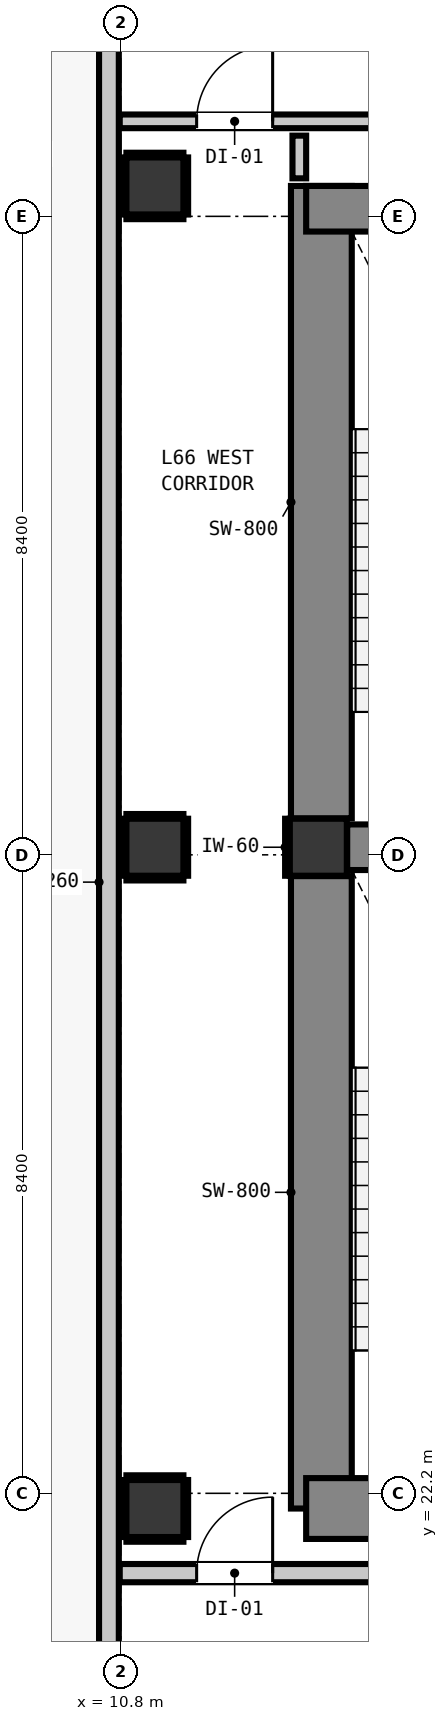
"""IFC4 building model, lengths in metres.
Left out: names, types, materials, properties, quantities, classifications, styles, units other than length and angle.
Written with IfcOpenShell. Run it as: python <this file> out.ifc"""

import sys

from ifc_helpers import new_model, si_unit, direction, frame, frame_2d, origin, origin_2d, place, context, subcontext, project, spatial, rectangle, extrude, element, fill, save


model = new_model("IFC4")
c1 = context("Model", 3, precision=1e-05, world=origin(), true_north=direction((0.0, 1.0)))
c2 = subcontext(c1, "Body", "Model", "MODEL_VIEW")
j1 = project(units=[si_unit("LENGTHUNIT", "METRE"), si_unit("PLANEANGLEUNIT", "RADIAN")], contexts=[c1])
p1 = place(None, origin())
s1 = spatial("IfcSite", under=j1, at=p1, CompositionType="ELEMENT")
p2 = place(p1, origin())
s2 = spatial("IfcBuilding", under=s1, at=p2, CompositionType="ELEMENT")
p3 = place(p2, frame((0.0, 0.0, 226.68)))
s3 = spatial("IfcBuildingStorey", under=s2, at=p3, CompositionType="ELEMENT", Elevation=226.68)
p4 = place(p3, frame((13.4, 30.7, 0.0), z_axis=(0.0, 0.0, 1.0), x_axis=(1.0, 0.0, 0.0)))
e1 = element("IfcColumn", 1, at=p4, inside=s3, PredefinedType="COLUMN", context=c2, shape_type="SweptSolid", body=[
    extrude(rectangle(XDim=0.75, YDim=0.75, at=origin_2d()), origin(), (0.0, 0.0, 1.0), 4.6),
])
p5 = place(p3, frame((13.44, 22.0, 0.0), z_axis=(0.0, 0.0, 1.0), x_axis=(0.0, 1.0, 0.0)))
e2 = element("IfcWall", 2, at=p5, inside=s3, PredefinedType="SHEAR", context=c2, shape_type="SweptSolid", body=[
    extrude(rectangle(XDim=8.32, YDim=0.8, at=frame_2d((4.16, 0.0))), origin(), (0.0, 0.0, 1.0), 4.6),
])
p6 = place(p3, frame((13.44, 31.08, 0.0), z_axis=(0.0, 0.0, 1.0), x_axis=(0.0, 1.0, 0.0)))
e3 = element("IfcWall", 3, at=p6, inside=s3, PredefinedType="SHEAR", context=c2, shape_type="SweptSolid", body=[
    extrude(rectangle(XDim=8.32, YDim=0.8, at=frame_2d((4.16, 0.0))), origin(), (0.0, 0.0, 1.0), 4.6),
])
p7 = place(p3, frame((13.24, 22.0, 0.0), z_axis=(0.0, 0.0, 1.0), x_axis=(1.0, 0.0, 0.0)))
e4 = element("IfcWall", 4, at=p7, inside=s3, PredefinedType="SHEAR", context=c2, shape_type="SweptSolid", body=[
    extrude(rectangle(XDim=4.08, YDim=0.8, at=frame_2d((2.04, 0.0))), origin(), (0.0, 0.0, 1.0), 4.6),
])
p8 = place(p3, frame((13.24, 39.1, 0.0), z_axis=(0.0, 0.0, 1.0), x_axis=(1.0, 0.0, 0.0)))
e5 = element("IfcWall", 5, at=p8, inside=s3, PredefinedType="SHEAR", context=c2, shape_type="SweptSolid", body=[
    extrude(rectangle(XDim=4.08, YDim=0.6, at=frame_2d((2.04, 0.0))), origin(), (0.0, 0.0, 1.0), 4.6),
])
p9 = place(p3, frame((13.78, 30.7, 0.0), z_axis=(0.0, 0.0, 1.0), x_axis=(1.0, 0.0, 0.0)))
e6 = element("IfcWall", 6, at=p9, inside=s3, PredefinedType="SHEAR", context=c2, shape_type="SweptSolid", body=[
    extrude(rectangle(XDim=3.54, YDim=0.6, at=frame_2d((1.77, 0.0))), origin(), (0.0, 0.0, 1.0), 4.6),
])
for number, where, z_axis, x_axis in (
    (7, (11.25, 22.0, 0.0), (0.0, 0.0, 1.0), (1.0, 0.0, 0.0)),
    (8, (11.25, 30.7, 0.0), (0.0, 0.0, 1.0), (1.0, 0.0, 0.0)),
    (9, (11.25, 39.4, 0.0), (0.0, 0.0, 1.0), (1.0, 0.0, 0.0)),
):
    element("IfcColumn", number, at=place(p3, frame(where, z_axis=z_axis, x_axis=x_axis)), inside=s3, PredefinedType="COLUMN", context=c2, shape_type="SweptSolid", body=[
        extrude(rectangle(XDim=0.75, YDim=0.75, at=origin_2d()), origin(), (0.0, 0.0, 1.0), 4.18),
    ])
p10 = place(p3, frame((10.645, 12.345, 0.0), z_axis=(0.0, 0.0, 1.0), x_axis=(0.0, 1.0, 0.0)))
e10 = element("IfcWall", 10, at=p10, inside=s3, PredefinedType="STANDARD", context=c2, shape_type="SweptSolid", body=[
    extrude(rectangle(XDim=30.31, YDim=0.26, at=frame_2d((15.155, 0.0))), origin(), (0.0, 0.0, 1.0), 4.18),
])
p11 = place(p10, frame((0.91, 0.0, 0.0)))
e11 = element("IfcOpeningElement", 11, at=p11, cuts=e10, PredefinedType="OPENING", context=c2, shape_type="SweptSolid", body=[
    extrude(rectangle(XDim=1.0, YDim=2.15, at=frame_2d((0.5, 1.075))), frame((0.0, 0.14, 0.0), z_axis=(0.0, -1.0, 0.0), x_axis=(1.0, 0.0, 0.0)), (0.0, 0.0, 1.0), 0.28),
])
p12 = place(p10, frame((3.732, 0.0, 0.85)))
e12 = element("IfcOpeningElement", 12, at=p12, cuts=e10, PredefinedType="OPENING", context=c2, shape_type="SweptSolid", body=[
    extrude(rectangle(XDim=1.65, YDim=1.75, at=frame_2d((0.825, 0.875))), frame((0.0, 0.14, 0.0), z_axis=(0.0, -1.0, 0.0), x_axis=(1.0, 0.0, 0.0)), (0.0, 0.0, 1.0), 0.28),
])
p13 = place(p3, frame((10.787, 21.15, 0.0), z_axis=(0.0, 0.0, 1.0), x_axis=(1.0, 0.0, 0.0)))
e13 = element("IfcWall", 13, at=p13, inside=s3, PredefinedType="PARTITIONING", context=c2, shape_type="SweptSolid", body=[
    extrude(rectangle(XDim=36.626, YDim=0.24, at=frame_2d((18.313, 0.0))), origin(), (0.0, 0.0, 1.0), 4.18),
])
p14 = place(p13, frame((7.423, 0.0, 0.0)))
e14 = element("IfcOpeningElement", 14, at=p14, cuts=e13, PredefinedType="OPENING", context=c2, shape_type="SweptSolid", body=[
    extrude(rectangle(XDim=1.1, YDim=2.15, at=frame_2d((0.55, 1.075))), frame((0.0, 0.13, 0.0), z_axis=(0.0, -1.0, 0.0), x_axis=(1.0, 0.0, 0.0)), (0.0, 0.0, 1.0), 0.26),
])
p15 = place(p13, frame((1.012, 0.0, 0.0)))
e15 = element("IfcOpeningElement", 15, at=p15, cuts=e13, PredefinedType="OPENING", context=c2, shape_type="SweptSolid", body=[
    extrude(rectangle(XDim=1.0, YDim=2.15, at=frame_2d((0.5, 1.075))), frame((0.0, 0.13, 0.0), z_axis=(0.0, -1.0, 0.0), x_axis=(1.0, 0.0, 0.0)), (0.0, 0.0, 1.0), 0.26),
])
p16 = place(p13, frame((27.239, 0.0, 0.0)))
e16 = element("IfcOpeningElement", 16, at=p16, cuts=e13, PredefinedType="OPENING", context=c2, shape_type="SweptSolid", body=[
    extrude(rectangle(XDim=1.4, YDim=2.15, at=frame_2d((0.7, 1.075))), frame((0.0, 0.13, 0.0), z_axis=(0.0, -1.0, 0.0), x_axis=(1.0, 0.0, 0.0)), (0.0, 0.0, 1.0), 0.26),
])
p17 = place(p3, frame((10.787, 40.25, 0.0), z_axis=(0.0, 0.0, 1.0), x_axis=(1.0, 0.0, 0.0)))
e17 = element("IfcWall", 17, at=p17, inside=s3, PredefinedType="PARTITIONING", context=c2, shape_type="SweptSolid", body=[
    extrude(rectangle(XDim=36.626, YDim=0.18, at=frame_2d((18.313, 0.0))), origin(), (0.0, 0.0, 1.0), 4.18),
])
p18 = place(p17, frame((6.648, 0.0, 0.0)))
e18 = element("IfcOpeningElement", 18, at=p18, cuts=e17, PredefinedType="OPENING", context=c2, shape_type="SweptSolid", body=[
    extrude(rectangle(XDim=1.4, YDim=2.15, at=frame_2d((0.7, 1.075))), frame((0.0, 0.1, 0.0), z_axis=(0.0, -1.0, 0.0), x_axis=(1.0, 0.0, 0.0)), (0.0, 0.0, 1.0), 0.2),
])
p19 = place(p17, frame((1.012, 0.0, 0.0)))
e19 = element("IfcOpeningElement", 19, at=p19, cuts=e17, PredefinedType="OPENING", context=c2, shape_type="SweptSolid", body=[
    extrude(rectangle(XDim=1.0, YDim=2.15, at=frame_2d((0.5, 1.075))), frame((0.0, 0.1, 0.0), z_axis=(0.0, -1.0, 0.0), x_axis=(1.0, 0.0, 0.0)), (0.0, 0.0, 1.0), 0.2),
])
p20 = place(p17, frame((27.263, 0.0, 0.0)))
e20 = element("IfcOpeningElement", 20, at=p20, cuts=e17, PredefinedType="OPENING", context=c2, shape_type="SweptSolid", body=[
    extrude(rectangle(XDim=1.4, YDim=2.15, at=frame_2d((0.7, 1.075))), frame((0.0, 0.1, 0.0), z_axis=(0.0, -1.0, 0.0), x_axis=(1.0, 0.0, 0.0)), (0.0, 0.0, 1.0), 0.2),
])
p21 = place(p17, frame((32.289, 0.0, 0.0)))
e21 = element("IfcOpeningElement", 21, at=p21, cuts=e17, PredefinedType="OPENING", context=c2, shape_type="SweptSolid", body=[
    extrude(rectangle(XDim=0.95, YDim=2.1, at=frame_2d((0.475, 1.05))), frame((0.0, 0.1, 0.0), z_axis=(0.0, -1.0, 0.0), x_axis=(1.0, 0.0, 0.0)), (0.0, 0.0, 1.0), 0.2),
])
p22 = place(p3, frame((13.15, 39.5, 0.0), z_axis=(0.0, 0.0, 1.0), x_axis=(0.0, 1.0, 0.0)))
e22 = element("IfcWall", 22, at=p22, inside=s3, PredefinedType="PARTITIONING", context=c2, shape_type="SweptSolid", body=[
    extrude(rectangle(XDim=0.562, YDim=0.18, at=frame_2d((0.281, 0.0))), origin(), (0.0, 0.0, 1.0), 2.185),
])
for number, where, z_axis, x_axis in (
    (23, (12.993, 30.325, 0.0), (0.0, 0.0, 1.0), (0.0, 1.0, 0.0)),
    (24, (10.875, 21.593, 0.0), (0.0, 0.0, 1.0), (1.0, 0.0, 0.0)),
    (25, (10.875, 22.407, 0.0), (0.0, 0.0, 1.0), (1.0, 0.0, 0.0)),
    (26, (10.843, 21.625, 0.0), (0.0, 0.0, 1.0), (0.0, 1.0, 0.0)),
    (27, (11.657, 21.625, 0.0), (0.0, 0.0, 1.0), (0.0, 1.0, 0.0)),
    (28, (10.875, 30.293, 0.0), (0.0, 0.0, 1.0), (1.0, 0.0, 0.0)),
    (29, (10.875, 31.107, 0.0), (0.0, 0.0, 1.0), (1.0, 0.0, 0.0)),
    (30, (10.843, 30.325, 0.0), (0.0, 0.0, 1.0), (0.0, 1.0, 0.0)),
    (31, (11.657, 30.325, 0.0), (0.0, 0.0, 1.0), (0.0, 1.0, 0.0)),
    (32, (10.875, 38.993, 0.0), (0.0, 0.0, 1.0), (1.0, 0.0, 0.0)),
    (33, (10.875, 39.807, 0.0), (0.0, 0.0, 1.0), (1.0, 0.0, 0.0)),
    (34, (10.843, 39.025, 0.0), (0.0, 0.0, 1.0), (0.0, 1.0, 0.0)),
    (35, (11.657, 39.025, 0.0), (0.0, 0.0, 1.0), (0.0, 1.0, 0.0)),
):
    element("IfcWall", number, at=place(p3, frame(where, z_axis=z_axis, x_axis=x_axis)), inside=s3, PredefinedType="PARTITIONING", context=c2, shape_type="SweptSolid", body=[
        extrude(rectangle(XDim=0.75, YDim=0.06, at=frame_2d((0.375, 0.0))), origin(), (0.0, 0.0, 1.0), 1.45),
    ])
p23 = place(p15, origin())
e36 = element("IfcDoor", 36, at=p23, inside=s3, OperationType="SINGLE_SWING_RIGHT", PredefinedType="DOOR", context=c2, shape_type="SweptSolid", body=[
    extrude(rectangle(XDim=1.0, YDim=2.15, at=frame_2d((0.5, 1.075))), frame((0.0, 0.025, 0.0), z_axis=(0.0, -1.0, 0.0), x_axis=(1.0, 0.0, 0.0)), (0.0, 0.0, 1.0), 0.05),
])
fill(e15, e36)
p24 = place(p19, origin())
e37 = element("IfcDoor", 37, at=p24, inside=s3, OperationType="SINGLE_SWING_RIGHT", PredefinedType="DOOR", context=c2, shape_type="SweptSolid", body=[
    extrude(rectangle(XDim=1.0, YDim=2.15, at=frame_2d((0.5, 1.075))), frame((0.0, 0.025, 0.0), z_axis=(0.0, -1.0, 0.0), x_axis=(1.0, 0.0, 0.0)), (0.0, 0.0, 1.0), 0.05),
])
fill(e19, e37)
save(model, sys.argv[1])
